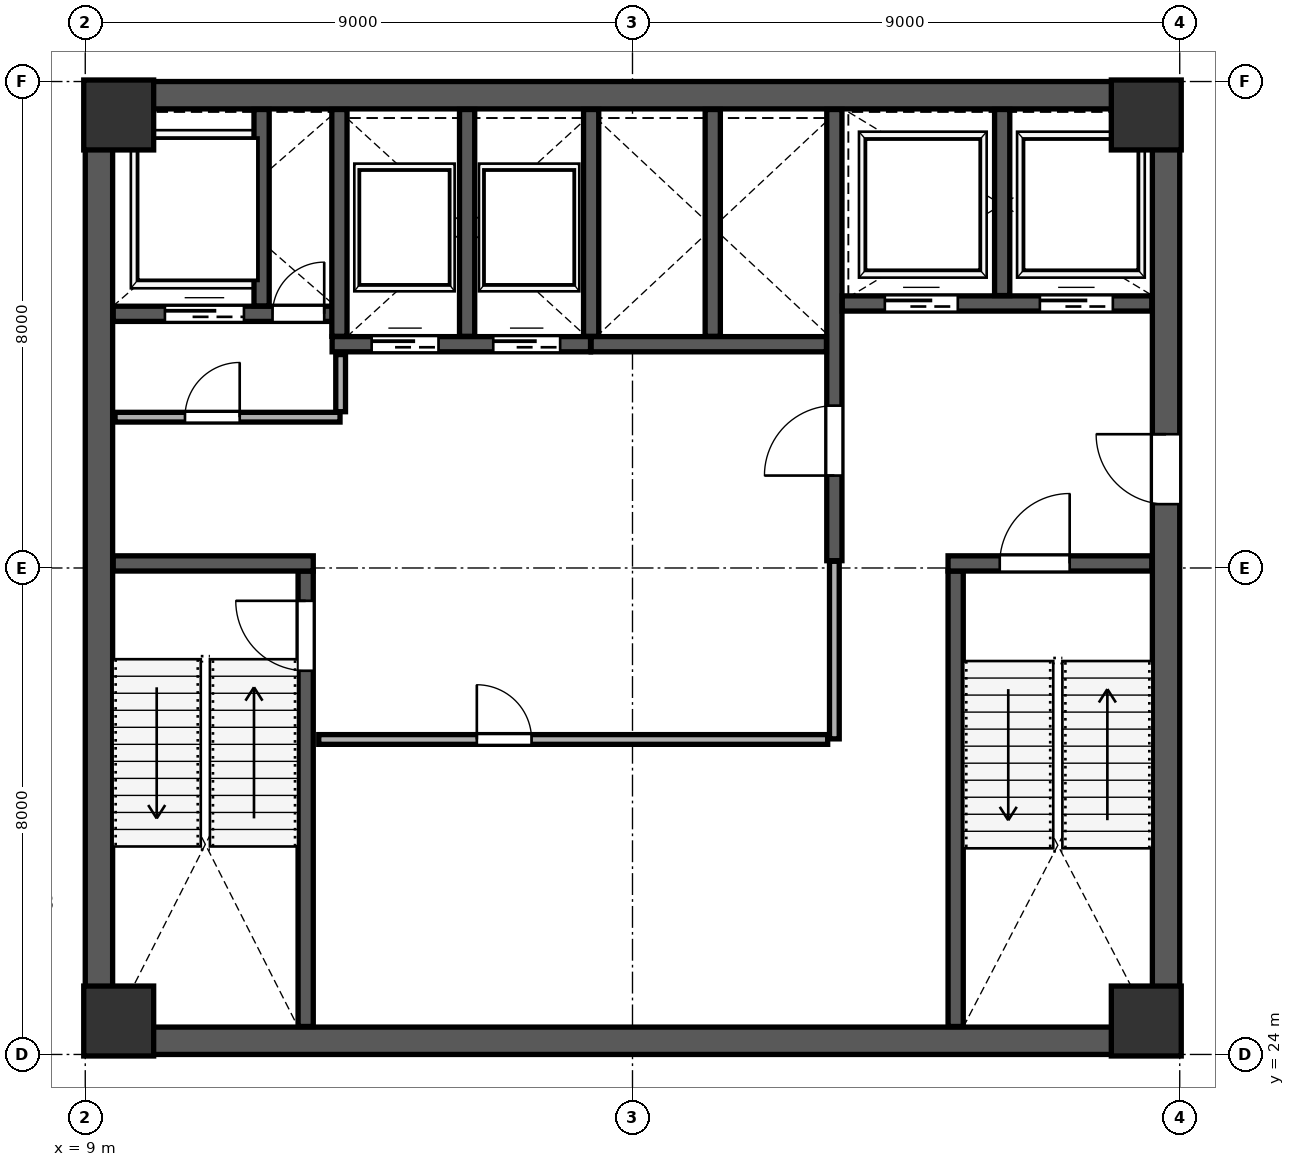
"""IFC4 building model, lengths in metres.
Left out: names, types, materials, properties, quantities, classifications, styles, units other than length and angle.
Written with IfcOpenShell. Run it as: python <this file> out.ifc"""

import sys

from ifc_helpers import new_model, si_unit, direction, frame, frame_2d, origin, origin_2d, place, context, subcontext, project, spatial, rectangle, extrude, source, transform, mapped, element, fill, save


model = new_model("IFC4")
c1 = context("Model", 3, precision=1e-05, world=origin(), true_north=direction((0.0, 1.0)))
c2 = subcontext(c1, "Body", "Model", "MODEL_VIEW")
j1 = project(units=[si_unit("LENGTHUNIT", "METRE"), si_unit("PLANEANGLEUNIT", "RADIAN")], contexts=[c1])
p1 = place(None, origin())
s1 = spatial("IfcSite", under=j1, at=p1, CompositionType="ELEMENT")
p2 = place(p1, origin())
s2 = spatial("IfcBuilding", under=s1, at=p2, CompositionType="ELEMENT")
p3 = place(p2, frame((0.0, 0.0, 200.2)))
s3 = spatial("IfcBuildingStorey", under=s2, at=p3, CompositionType="ELEMENT", Elevation=200.2)
m1 = source(origin(), c2, "Body", "SweptSolid", [
    extrude(rectangle(XDim=1.15, YDim=1.15, at=origin_2d()), origin(), (0.0, 0.0, 1.0), 4.198),
])
for number, where, z_axis, x_axis in (
    (1, (9.55, 24.55, 0.001), (0.0, 0.0, 1.0), (1.0, 0.0, 0.0)),
    (2, (26.45, 24.55, 0.001), (0.0, 0.0, 1.0), (1.0, 0.0, 0.0)),
    (3, (9.55, 39.45, 0.001), (0.0, 0.0, 1.0), (1.0, 0.0, 0.0)),
    (4, (26.45, 39.45, 0.001), (0.0, 0.0, 1.0), (1.0, 0.0, 0.0)),
):
    element("IfcColumn", number, at=place(p3, frame(where, z_axis=z_axis, x_axis=x_axis)), inside=s3, PredefinedType="COLUMN", context=c2, shape_type="MappedRepresentation", body=[
        mapped(m1, transform((0.0, 0.0, 0.0), scale=1.0)),
    ])
p4 = place(p3, frame((9.225, 24.45, 0.0), z_axis=(0.0, 0.0, 1.0), x_axis=(0.0, 1.0, 0.0)))
e5 = element("IfcWall", 5, at=p4, inside=s3, PredefinedType="SHEAR", context=c2, shape_type="SweptSolid", body=[
    extrude(rectangle(XDim=15.1, YDim=0.45, at=frame_2d((7.55, 0.0))), origin(), (0.0, 0.0, 1.0), 3.96),
])
p5 = place(p3, frame((26.775, 24.45, 0.0), z_axis=(0.0, 0.0, 1.0), x_axis=(0.0, 1.0, 0.0)))
e6 = element("IfcWall", 6, at=p5, inside=s3, PredefinedType="SHEAR", context=c2, shape_type="SweptSolid", body=[
    extrude(rectangle(XDim=15.1, YDim=0.45, at=frame_2d((7.55, 0.0))), origin(), (0.0, 0.0, 1.0), 3.96),
])
p6 = place(p5, frame((8.6, 0.0, 0.0)))
e7 = element("IfcOpeningElement", 7, at=p6, cuts=e6, PredefinedType="OPENING", context=c2, shape_type="SweptSolid", body=[
    extrude(rectangle(XDim=1.15, YDim=2.2, at=frame_2d((0.575, 1.1))), frame((0.0, 0.235, 0.0), z_axis=(0.0, -1.0, 0.0), x_axis=(1.0, 0.0, 0.0)), (0.0, 0.0, 1.0), 0.47),
])
for number, where, z_axis, x_axis in (
    (8, (9.0, 24.225, 0.0), (0.0, 0.0, 1.0), (1.0, 0.0, 0.0)),
    (9, (9.0, 39.775, 0.0), (0.0, 0.0, 1.0), (1.0, 0.0, 0.0)),
):
    element("IfcWall", number, at=place(p3, frame(where, z_axis=z_axis, x_axis=x_axis)), inside=s3, PredefinedType="SHEAR", context=c2, shape_type="SweptSolid", body=[
        extrude(rectangle(XDim=18.0, YDim=0.45, at=frame_2d((9.0, 0.0))), origin(), (0.0, 0.0, 1.0), 3.96),
    ])
p7 = place(p3, frame((12.625, 24.46, 0.0), z_axis=(0.0, 0.0, 1.0), x_axis=(0.0, 1.0, 0.0)))
e10 = element("IfcWall", 10, at=p7, inside=s3, PredefinedType="SHEAR", context=c2, shape_type="SweptSolid", body=[
    extrude(rectangle(XDim=7.49, YDim=0.25, at=frame_2d((3.745, 0.0))), origin(), (0.0, 0.0, 1.0), 3.96),
])
p8 = place(p7, frame((5.85, 0.0, 0.0)))
e11 = element("IfcOpeningElement", 11, at=p8, cuts=e10, PredefinedType="OPENING", context=c2, shape_type="SweptSolid", body=[
    extrude(rectangle(XDim=1.15, YDim=2.2, at=frame_2d((0.575, 1.1))), frame((0.0, 0.135, 0.0), z_axis=(0.0, -1.0, 0.0), x_axis=(1.0, 0.0, 0.0)), (0.0, 0.0, 1.0), 0.27),
])
p9 = place(p3, frame((9.46, 32.075, 0.0), z_axis=(0.0, 0.0, 1.0), x_axis=(1.0, 0.0, 0.0)))
e12 = element("IfcWall", 12, at=p9, inside=s3, PredefinedType="SHEAR", context=c2, shape_type="SweptSolid", body=[
    extrude(rectangle(XDim=3.29, YDim=0.25, at=frame_2d((1.645, 0.0))), origin(), (0.0, 0.0, 1.0), 3.96),
])
p10 = place(p3, frame((23.315, 24.46, 0.0), z_axis=(0.0, 0.0, 1.0), x_axis=(0.0, 1.0, 0.0)))
e13 = element("IfcWall", 13, at=p10, inside=s3, PredefinedType="SHEAR", context=c2, shape_type="SweptSolid", body=[
    extrude(rectangle(XDim=7.49, YDim=0.25, at=frame_2d((3.745, 0.0))), origin(), (0.0, 0.0, 1.0), 3.96),
])
p11 = place(p3, frame((23.19, 32.075, 0.0), z_axis=(0.0, 0.0, 1.0), x_axis=(1.0, 0.0, 0.0)))
e14 = element("IfcWall", 14, at=p11, inside=s3, PredefinedType="SHEAR", context=c2, shape_type="SweptSolid", body=[
    extrude(rectangle(XDim=3.35, YDim=0.25, at=frame_2d((1.675, 0.0))), origin(), (0.0, 0.0, 1.0), 3.96),
])
p12 = place(p11, frame((0.85, 0.0, 0.0)))
e15 = element("IfcOpeningElement", 15, at=p12, cuts=e14, PredefinedType="OPENING", context=c2, shape_type="SweptSolid", body=[
    extrude(rectangle(XDim=1.15, YDim=2.2, at=frame_2d((0.575, 1.1))), frame((0.0, 0.135, 0.0), z_axis=(0.0, -1.0, 0.0), x_axis=(1.0, 0.0, 0.0)), (0.0, 0.0, 1.0), 0.27),
])
p13 = place(p3, frame((21.32, 32.12, 0.0), z_axis=(0.0, 0.0, 1.0), x_axis=(0.0, 1.0, 0.0)))
e16 = element("IfcWall", 16, at=p13, inside=s3, PredefinedType="SHEAR", context=c2, shape_type="SweptSolid", body=[
    extrude(rectangle(XDim=7.42, YDim=0.25, at=frame_2d((3.71, 0.0))), origin(), (0.0, 0.0, 1.0), 3.96),
])
p14 = place(p13, frame((1.4, 0.0, 0.0)))
e17 = element("IfcOpeningElement", 17, at=p14, cuts=e16, PredefinedType="OPENING", context=c2, shape_type="SweptSolid", body=[
    extrude(rectangle(XDim=1.15, YDim=2.2, at=frame_2d((0.575, 1.1))), frame((0.0, 0.135, 0.0), z_axis=(0.0, -1.0, 0.0), x_axis=(1.0, 0.0, 0.0)), (0.0, 0.0, 1.0), 0.27),
])
p15 = place(p3, frame((9.46, 36.18, 0.0), z_axis=(0.0, 0.0, 1.0), x_axis=(1.0, 0.0, 0.0)))
e18 = element("IfcWall", 18, at=p15, inside=s3, PredefinedType="SHEAR", context=c2, shape_type="SweptSolid", body=[
    extrude(rectangle(XDim=3.79, YDim=0.25, at=frame_2d((1.895, 0.0))), origin(), (0.0, 0.0, 1.0), 3.96),
])
p16 = place(p15, frame((2.62, 0.0, 0.0)))
e19 = element("IfcOpeningElement", 19, at=p16, cuts=e18, PredefinedType="OPENING", context=c2, shape_type="SweptSolid", body=[
    extrude(rectangle(XDim=0.85, YDim=2.1, at=frame_2d((0.425, 1.05))), frame((0.0, 0.135, 0.0), z_axis=(0.0, -1.0, 0.0), x_axis=(1.0, 0.0, 0.0)), (0.0, 0.0, 1.0), 0.27),
])
p17 = place(p15, frame((0.85, 0.0, 0.0)))
e20 = element("IfcOpeningElement", 20, at=p17, cuts=e18, PredefinedType="OPENING", context=c2, shape_type="SweptSolid", body=[
    extrude(rectangle(XDim=1.3, YDim=2.25, at=frame_2d((0.65, 1.125))), frame((0.0, 0.135, 0.0), z_axis=(0.0, -1.0, 0.0), x_axis=(1.0, 0.0, 0.0)), (0.0, 0.0, 1.0), 0.27),
])
p18 = place(p3, frame((11.9, 36.31, 0.0), z_axis=(0.0, 0.0, 1.0), x_axis=(0.0, 1.0, 0.0)))
e21 = element("IfcWall", 21, at=p18, inside=s3, PredefinedType="SHEAR", context=c2, shape_type="SweptSolid", body=[
    extrude(rectangle(XDim=3.23, YDim=0.25, at=frame_2d((1.615, 0.0))), origin(), (0.0, 0.0, 1.0), 3.96),
])
p19 = place(p3, frame((21.45, 36.35, 0.0), z_axis=(0.0, 0.0, 1.0), x_axis=(1.0, 0.0, 0.0)))
e22 = element("IfcWall", 22, at=p19, inside=s3, PredefinedType="SHEAR", context=c2, shape_type="SweptSolid", body=[
    extrude(rectangle(XDim=5.09, YDim=0.25, at=frame_2d((2.545, 0.0))), origin(), (0.0, 0.0, 1.0), 3.96),
])
p20 = place(p19, frame((0.7, 0.0, 0.0)))
e23 = element("IfcOpeningElement", 23, at=p20, cuts=e22, PredefinedType="OPENING", context=c2, shape_type="SweptSolid", body=[
    extrude(rectangle(XDim=1.2, YDim=2.2, at=frame_2d((0.6, 1.1))), frame((0.0, 0.135, 0.0), z_axis=(0.0, -1.0, 0.0), x_axis=(1.0, 0.0, 0.0)), (0.0, 0.0, 1.0), 0.27),
])
p21 = place(p19, frame((3.25, 0.0, 0.0)))
e24 = element("IfcOpeningElement", 24, at=p21, cuts=e22, PredefinedType="OPENING", context=c2, shape_type="SweptSolid", body=[
    extrude(rectangle(XDim=1.2, YDim=2.2, at=frame_2d((0.6, 1.1))), frame((0.0, 0.135, 0.0), z_axis=(0.0, -1.0, 0.0), x_axis=(1.0, 0.0, 0.0)), (0.0, 0.0, 1.0), 0.27),
])
p22 = place(p3, frame((24.08, 36.48, 0.0), z_axis=(0.0, 0.0, 1.0), x_axis=(0.0, 1.0, 0.0)))
e25 = element("IfcWall", 25, at=p22, inside=s3, PredefinedType="SHEAR", context=c2, shape_type="SweptSolid", body=[
    extrude(rectangle(XDim=3.06, YDim=0.25, at=frame_2d((1.53, 0.0))), origin(), (0.0, 0.0, 1.0), 3.96),
])
p23 = place(p3, frame((13.06, 35.68, 0.0), z_axis=(0.0, 0.0, 1.0), x_axis=(1.0, 0.0, 0.0)))
e26 = element("IfcWall", 26, at=p23, inside=s3, PredefinedType="SHEAR", context=c2, shape_type="SweptSolid", body=[
    extrude(rectangle(XDim=4.25, YDim=0.25, at=frame_2d((2.125, 0.0))), origin(), (0.0, 0.0, 1.0), 3.96),
])
p24 = place(p23, frame((0.65, 0.0, 0.0)))
e27 = element("IfcOpeningElement", 27, at=p24, cuts=e26, PredefinedType="OPENING", context=c2, shape_type="SweptSolid", body=[
    extrude(rectangle(XDim=1.1, YDim=2.2, at=frame_2d((0.55, 1.1))), frame((0.0, 0.135, 0.0), z_axis=(0.0, -1.0, 0.0), x_axis=(1.0, 0.0, 0.0)), (0.0, 0.0, 1.0), 0.27),
])
p25 = place(p23, frame((2.65, 0.0, 0.0)))
e28 = element("IfcOpeningElement", 28, at=p25, cuts=e26, PredefinedType="OPENING", context=c2, shape_type="SweptSolid", body=[
    extrude(rectangle(XDim=1.1, YDim=2.2, at=frame_2d((0.55, 1.1))), frame((0.0, 0.135, 0.0), z_axis=(0.0, -1.0, 0.0), x_axis=(1.0, 0.0, 0.0)), (0.0, 0.0, 1.0), 0.27),
])
for number, where, z_axis, x_axis in (
    (29, (13.18, 35.81, 0.0), (0.0, 0.0, 1.0), (0.0, 1.0, 0.0)),
    (30, (15.28, 35.81, 0.0), (0.0, 0.0, 1.0), (0.0, 1.0, 0.0)),
):
    element("IfcWall", number, at=place(p3, frame(where, z_axis=z_axis, x_axis=x_axis)), inside=s3, PredefinedType="SHEAR", context=c2, shape_type="SweptSolid", body=[
        extrude(rectangle(XDim=3.73, YDim=0.25, at=frame_2d((1.865, 0.0))), origin(), (0.0, 0.0, 1.0), 3.96),
    ])
p26 = place(p3, frame((17.32, 35.68, 0.0), z_axis=(0.0, 0.0, 1.0), x_axis=(1.0, 0.0, 0.0)))
e31 = element("IfcWall", 31, at=p26, inside=s3, PredefinedType="SHEAR", context=c2, shape_type="SweptSolid", body=[
    extrude(rectangle(XDim=3.87, YDim=0.25, at=frame_2d((1.935, 0.0))), origin(), (0.0, 0.0, 1.0), 3.96),
])
for number, where, z_axis, x_axis in (
    (32, (17.32, 35.81, 0.0), (0.0, 0.0, 1.0), (0.0, 1.0, 0.0)),
    (33, (19.32, 35.81, 0.0), (0.0, 0.0, 1.0), (0.0, 1.0, 0.0)),
):
    element("IfcWall", number, at=place(p3, frame(where, z_axis=z_axis, x_axis=x_axis)), inside=s3, PredefinedType="SHEAR", context=c2, shape_type="SweptSolid", body=[
        extrude(rectangle(XDim=3.73, YDim=0.25, at=frame_2d((1.865, 0.0))), origin(), (0.0, 0.0, 1.0), 3.96),
    ])
p27 = place(p3, frame((9.49, 34.48, 0.0), z_axis=(0.0, 0.0, 1.0), x_axis=(1.0, 0.0, 0.0)))
e34 = element("IfcWall", 34, at=p27, inside=s3, PredefinedType="PARTITIONING", context=c2, shape_type="SweptSolid", body=[
    extrude(rectangle(XDim=3.7, YDim=0.16, at=frame_2d((1.85, 0.0))), origin(), (0.0, 0.0, 1.0), 3.96),
])
p28 = place(p27, frame((1.15, 0.0, 0.0)))
e35 = element("IfcOpeningElement", 35, at=p28, cuts=e34, PredefinedType="OPENING", context=c2, shape_type="SweptSolid", body=[
    extrude(rectangle(XDim=0.9, YDim=2.15, at=frame_2d((0.45, 1.075))), frame((0.0, 0.09, 0.0), z_axis=(0.0, -1.0, 0.0), x_axis=(1.0, 0.0, 0.0)), (0.0, 0.0, 1.0), 0.18),
])
p29 = place(p3, frame((13.2, 34.57, 0.0), z_axis=(0.0, 0.0, 1.0), x_axis=(0.0, 1.0, 0.0)))
e36 = element("IfcWall", 36, at=p29, inside=s3, PredefinedType="PARTITIONING", context=c2, shape_type="SweptSolid", body=[
    extrude(rectangle(XDim=0.94, YDim=0.16, at=frame_2d((0.47, 0.0))), origin(), (0.0, 0.0, 1.0), 3.96),
])
p30 = place(p3, frame((12.84, 29.18, 0.0), z_axis=(0.0, 0.0, 1.0), x_axis=(1.0, 0.0, 0.0)))
e37 = element("IfcWall", 37, at=p30, inside=s3, PredefinedType="PARTITIONING", context=c2, shape_type="SweptSolid", body=[
    extrude(rectangle(XDim=8.37, YDim=0.16, at=frame_2d((4.185, 0.0))), origin(), (0.0, 0.0, 1.0), 3.96),
])
p31 = place(p30, frame((2.6, 0.0, 0.0)))
e38 = element("IfcOpeningElement", 38, at=p31, cuts=e37, PredefinedType="OPENING", context=c2, shape_type="SweptSolid", body=[
    extrude(rectangle(XDim=0.9, YDim=2.15, at=frame_2d((0.45, 1.075))), frame((0.0, 0.09, 0.0), z_axis=(0.0, -1.0, 0.0), x_axis=(1.0, 0.0, 0.0)), (0.0, 0.0, 1.0), 0.18),
])
p32 = place(p3, frame((21.32, 29.19, 0.0), z_axis=(0.0, 0.0, 1.0), x_axis=(0.0, 1.0, 0.0)))
e39 = element("IfcWall", 39, at=p32, inside=s3, PredefinedType="PARTITIONING", context=c2, shape_type="SweptSolid", body=[
    extrude(rectangle(XDim=2.92, YDim=0.16, at=frame_2d((1.46, 0.0))), origin(), (0.0, 0.0, 1.0), 3.96),
])
p33 = place(p3, frame((14.821, 50.374, 0.0), z_axis=(0.0, 0.0, 1.0), x_axis=(0.819153719849, -0.573574043396, 0.0)))
e40 = element("IfcWall", 40, at=p33, inside=s3, PredefinedType="PARTITIONING", context=c2, shape_type="SweptSolid", body=[
    extrude(rectangle(XDim=26.99, YDim=0.115, at=frame_2d((13.495, 0.0))), origin(), (0.0, 0.0, 1.0), 3.96),
])
p34 = place(p33, frame((18.8, 0.0, 0.0)))
e41 = element("IfcOpeningElement", 41, at=p34, cuts=e40, PredefinedType="OPENING", context=c2, shape_type="SweptSolid", body=[
    extrude(rectangle(XDim=0.95, YDim=2.15, at=frame_2d((0.475, 1.075))), frame((0.0, 0.067, 0.0), z_axis=(0.0, -1.0, 0.0), x_axis=(1.0, 0.0, 0.0)), (0.0, 0.0, 1.0), 0.135),
])
p35 = place(p3, frame((1.189, 30.975, 0.0), z_axis=(0.0, 0.0, 1.0), x_axis=(0.573571020786, 0.819155836282, 0.0)))
e42 = element("IfcWall", 42, at=p35, inside=s3, PredefinedType="PARTITIONING", context=c2, shape_type="SweptSolid", body=[
    extrude(rectangle(XDim=23.67, YDim=0.135, at=frame_2d((11.835, 0.0))), origin(), (0.0, 0.0, 1.0), 3.96),
])
p36 = place(p35, frame((2.2, 0.0, 0.0)))
e43 = element("IfcOpeningElement", 43, at=p36, cuts=e42, PredefinedType="OPENING", context=c2, shape_type="SweptSolid", body=[
    extrude(rectangle(XDim=0.95, YDim=2.15, at=frame_2d((0.475, 1.075))), frame((0.0, 0.078, 0.0), z_axis=(0.0, -1.0, 0.0), x_axis=(1.0, 0.0, 0.0)), (0.0, 0.0, 1.0), 0.155),
])
m2 = source(origin(), c2, "Body", "SweptSolid", [
    extrude(rectangle(XDim=1.15, YDim=2.2, at=frame_2d((0.575, 1.1))), frame((0.0, 0.025, 0.0), z_axis=(0.0, -1.0, 0.0), x_axis=(1.0, 0.0, 0.0)), (0.0, 0.0, 1.0), 0.05),
])
p37 = place(p8, origin())
e44 = element("IfcDoor", 44, at=p37, inside=s3, OperationType="SINGLE_SWING_RIGHT", PredefinedType="DOOR", context=c2, shape_type="MappedRepresentation", body=[
    mapped(m2, transform((0.0, 0.0, 0.0), scale=1.0)),
])
fill(e11, e44)
m3 = source(origin(), c2, "Body", "SweptSolid", [
    extrude(rectangle(XDim=1.15, YDim=2.2, at=frame_2d((0.575, 1.1))), frame((0.0, 0.025, 0.0), z_axis=(0.0, -1.0, 0.0), x_axis=(1.0, 0.0, 0.0)), (0.0, 0.0, 1.0), 0.05),
])
p38 = place(p14, origin())
e45 = element("IfcDoor", 45, at=p38, inside=s3, OperationType="SINGLE_SWING_LEFT", PredefinedType="DOOR", context=c2, shape_type="MappedRepresentation", body=[
    mapped(m3, transform((0.0, 0.0, 0.0), scale=1.0)),
])
fill(e17, e45)
p39 = place(p12, origin())
e46 = element("IfcDoor", 46, at=p39, inside=s3, OperationType="SINGLE_SWING_RIGHT", PredefinedType="DOOR", context=c2, shape_type="MappedRepresentation", body=[
    mapped(m2, transform((0.0, 0.0, 0.0), scale=1.0)),
])
fill(e15, e46)
p40 = place(p6, origin())
e47 = element("IfcDoor", 47, at=p40, inside=s3, OperationType="SINGLE_SWING_RIGHT", PredefinedType="DOOR", context=c2, shape_type="MappedRepresentation", body=[
    mapped(m3, transform((0.0, 0.0, 0.0), scale=1.0)),
])
fill(e7, e47)
m4 = source(origin(), c2, "Body", "SweptSolid", [
    extrude(rectangle(XDim=0.85, YDim=2.1, at=frame_2d((0.425, 1.05))), frame((0.0, 0.025, 0.0), z_axis=(0.0, -1.0, 0.0), x_axis=(1.0, 0.0, 0.0)), (0.0, 0.0, 1.0), 0.05),
])
p41 = place(p16, origin())
e48 = element("IfcDoor", 48, at=p41, inside=s3, OperationType="SINGLE_SWING_RIGHT", PredefinedType="DOOR", context=c2, shape_type="MappedRepresentation", body=[
    mapped(m4, transform((0.0, 0.0, 0.0), scale=1.0)),
])
fill(e19, e48)
m5 = source(origin(), c2, "Body", "SweptSolid", [
    extrude(rectangle(XDim=1.1, YDim=2.2, at=frame_2d((0.55, 1.1))), frame((0.0, 0.025, 0.0), z_axis=(0.0, -1.0, 0.0), x_axis=(1.0, 0.0, 0.0)), (0.0, 0.0, 1.0), 0.05),
])
p42 = place(p24, origin())
e49 = element("IfcDoor", 49, at=p42, inside=s3, OperationType="SLIDING_TO_LEFT", PredefinedType="DOOR", context=c2, shape_type="MappedRepresentation", body=[
    mapped(m5, transform((0.0, 0.0, 0.0), scale=1.0)),
])
fill(e27, e49)
p43 = place(p25, origin())
e50 = element("IfcDoor", 50, at=p43, inside=s3, OperationType="SLIDING_TO_RIGHT", PredefinedType="DOOR", context=c2, shape_type="MappedRepresentation", body=[
    mapped(m5, transform((0.0, 0.0, 0.0), scale=1.0)),
])
fill(e28, e50)
m6 = source(origin(), c2, "Body", "SweptSolid", [
    extrude(rectangle(XDim=1.2, YDim=2.2, at=frame_2d((0.6, 1.1))), frame((0.0, 0.025, 0.0), z_axis=(0.0, -1.0, 0.0), x_axis=(1.0, 0.0, 0.0)), (0.0, 0.0, 1.0), 0.05),
])
p44 = place(p20, origin())
e51 = element("IfcDoor", 51, at=p44, inside=s3, OperationType="SLIDING_TO_LEFT", PredefinedType="DOOR", context=c2, shape_type="MappedRepresentation", body=[
    mapped(m6, transform((0.0, 0.0, 0.0), scale=1.0)),
])
fill(e23, e51)
p45 = place(p21, origin())
e52 = element("IfcDoor", 52, at=p45, inside=s3, OperationType="SLIDING_TO_RIGHT", PredefinedType="DOOR", context=c2, shape_type="MappedRepresentation", body=[
    mapped(m6, transform((0.0, 0.0, 0.0), scale=1.0)),
])
fill(e24, e52)
m7 = source(origin(), c2, "Body", "SweptSolid", [
    extrude(rectangle(XDim=1.3, YDim=2.25, at=frame_2d((0.65, 1.125))), frame((0.0, 0.025, 0.0), z_axis=(0.0, -1.0, 0.0), x_axis=(1.0, 0.0, 0.0)), (0.0, 0.0, 1.0), 0.05),
])
p46 = place(p17, origin())
e53 = element("IfcDoor", 53, at=p46, inside=s3, OperationType="SLIDING_TO_LEFT", PredefinedType="DOOR", context=c2, shape_type="MappedRepresentation", body=[
    mapped(m7, transform((0.0, 0.0, 0.0), scale=1.0)),
])
fill(e20, e53)
m8 = source(origin(), c2, "Body", "SweptSolid", [
    extrude(rectangle(XDim=0.9, YDim=2.15, at=frame_2d((0.45, 1.075))), frame((0.0, 0.025, 0.0), z_axis=(0.0, -1.0, 0.0), x_axis=(1.0, 0.0, 0.0)), (0.0, 0.0, 1.0), 0.05),
])
p47 = place(p28, origin())
e54 = element("IfcDoor", 54, at=p47, inside=s3, OperationType="SINGLE_SWING_RIGHT", PredefinedType="DOOR", context=c2, shape_type="MappedRepresentation", body=[
    mapped(m8, transform((0.0, 0.0, 0.0), scale=1.0)),
])
fill(e35, e54)
p48 = place(p31, origin())
e55 = element("IfcDoor", 55, at=p48, inside=s3, OperationType="SINGLE_SWING_LEFT", PredefinedType="DOOR", context=c2, shape_type="MappedRepresentation", body=[
    mapped(m8, transform((0.0, 0.0, 0.0), scale=1.0)),
])
fill(e38, e55)
save(model, sys.argv[1])
